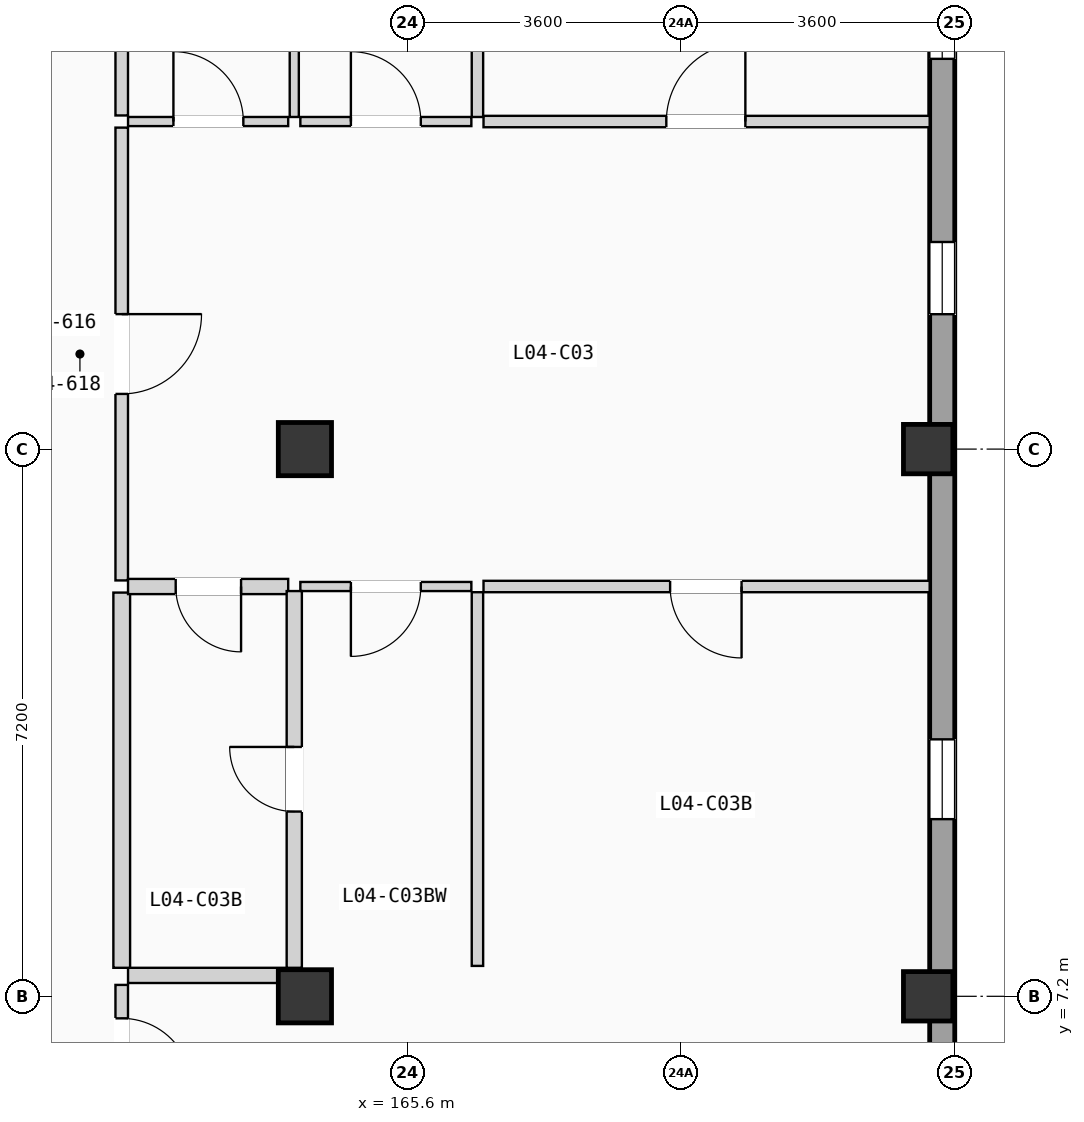
"""IFC4 building model, lengths in metres.
Left out: names, types, materials, properties, quantities, classifications, styles, units other than length and angle.
Written with IfcOpenShell. Run it as: python <this file> out.ifc"""

import sys

from ifc_helpers import new_model, si_unit, direction, frame, frame_2d, origin, origin_2d, place, context, subcontext, project, spatial, rectangle, extrude, element, fill, save


model = new_model("IFC4")
c1 = context("Model", 3, precision=1e-05, world=origin(), true_north=direction((0.0, 1.0)))
c2 = subcontext(c1, "Body", "Model", "MODEL_VIEW")
j1 = project(units=[si_unit("LENGTHUNIT", "METRE"), si_unit("PLANEANGLEUNIT", "RADIAN")], contexts=[c1])
p1 = place(None, origin())
s1 = spatial("IfcSite", under=j1, at=p1, CompositionType="ELEMENT")
p2 = place(p1, origin())
s2 = spatial("IfcBuilding", under=s1, at=p2, CompositionType="ELEMENT")
p3 = place(p2, frame((0.0, 0.0, 15.225)))
s3 = spatial("IfcBuildingStorey", under=s2, at=p3, CompositionType="ELEMENT", Elevation=15.225)
for number, where, z_axis, x_axis in (
    (1, (164.25, 7.2, 0.0), (0.0, 0.0, 1.0), (1.0, 0.0, 0.0)),
    (2, (164.25, 14.4, 0.0), (0.0, 0.0, 1.0), (1.0, 0.0, 0.0)),
):
    element("IfcColumn", number, at=place(p3, frame(where, z_axis=z_axis, x_axis=x_axis)), inside=s3, PredefinedType="COLUMN", context=c2, shape_type="SweptSolid", body=[
        extrude(rectangle(XDim=0.7, YDim=0.7, at=origin_2d()), origin(), (0.0, 0.0, 1.0), 3.15),
    ])
for number, where, z_axis, x_axis in (
    (3, (172.45, 7.2, 0.0), (0.0, 0.0, 1.0), (1.0, 0.0, 0.0)),
    (4, (172.45, 14.4, 0.0), (0.0, 0.0, 1.0), (1.0, 0.0, 0.0)),
):
    element("IfcColumn", number, at=place(p3, frame(where, z_axis=z_axis, x_axis=x_axis)), inside=s3, PredefinedType="COLUMN", context=c2, shape_type="SweptSolid", body=[
        extrude(rectangle(XDim=0.65, YDim=0.65, at=origin_2d()), origin(), (0.0, 0.0, 1.0), 3.15),
    ])
p4 = place(p3, frame((172.635, 0.33, 0.0), z_axis=(0.0, 0.0, 1.0), x_axis=(0.0, 1.0, 0.0)))
e5 = element("IfcWall", 5, at=p4, inside=s3, PredefinedType="SOLIDWALL", context=c2, shape_type="SweptSolid", body=[
    extrude(rectangle(XDim=49.74, YDim=0.33, at=frame_2d((24.87, 0.0))), origin(), (0.0, 0.0, 1.0), 2.89),
])
p5 = place(p4, frame((15.845, 0.0, 0.85)))
e6 = element("IfcOpeningElement", 6, at=p5, cuts=e5, PredefinedType="OPENING", context=c2, shape_type="SweptSolid", body=[
    extrude(rectangle(XDim=0.95, YDim=1.2, at=frame_2d((0.475, 0.6))), frame((0.0, 0.175, 0.0), z_axis=(0.0, -1.0, 0.0), x_axis=(1.0, 0.0, 0.0)), (0.0, 0.0, 1.0), 0.35),
])
p6 = place(p4, frame((9.201, 0.0, 0.9)))
e7 = element("IfcOpeningElement", 7, at=p6, cuts=e5, PredefinedType="OPENING", context=c2, shape_type="SweptSolid", body=[
    extrude(rectangle(XDim=1.05, YDim=1.2, at=frame_2d((0.525, 0.6))), frame((0.0, 0.175, 0.0), z_axis=(0.0, -1.0, 0.0), x_axis=(1.0, 0.0, 0.0)), (0.0, 0.0, 1.0), 0.35),
])
p7 = place(p4, frame((19.205, 0.0, 0.855)))
e8 = element("IfcOpeningElement", 8, at=p7, cuts=e5, PredefinedType="OPENING", context=c2, shape_type="SweptSolid", body=[
    extrude(rectangle(XDim=1.05, YDim=1.35, at=frame_2d((0.525, 0.675))), frame((0.0, 0.175, 0.0), z_axis=(0.0, -1.0, 0.0), x_axis=(1.0, 0.0, 0.0)), (0.0, 0.0, 1.0), 0.35),
])
p8 = place(p4, frame((31.923, 0.0, 0.705)))
e9 = element("IfcOpeningElement", 9, at=p8, cuts=e5, PredefinedType="OPENING", context=c2, shape_type="SweptSolid", body=[
    extrude(rectangle(XDim=1.05, YDim=1.5, at=frame_2d((0.525, 0.75))), frame((0.0, 0.175, 0.0), z_axis=(0.0, -1.0, 0.0), x_axis=(1.0, 0.0, 0.0)), (0.0, 0.0, 1.0), 0.35),
])
p9 = place(p4, frame((25.351, 0.0, 0.555)))
e10 = element("IfcOpeningElement", 10, at=p9, cuts=e5, PredefinedType="OPENING", context=c2, shape_type="SweptSolid", body=[
    extrude(rectangle(XDim=1.05, YDim=1.65, at=frame_2d((0.525, 0.825))), frame((0.0, 0.175, 0.0), z_axis=(0.0, -1.0, 0.0), x_axis=(1.0, 0.0, 0.0)), (0.0, 0.0, 1.0), 0.35),
])
p10 = place(p4, frame((39.102, 0.0, 0.85)))
e11 = element("IfcOpeningElement", 11, at=p10, cuts=e5, PredefinedType="OPENING", context=c2, shape_type="SweptSolid", body=[
    extrude(rectangle(XDim=0.95, YDim=1.2, at=frame_2d((0.475, 0.6))), frame((0.0, 0.175, 0.0), z_axis=(0.0, -1.0, 0.0), x_axis=(1.0, 0.0, 0.0)), (0.0, 0.0, 1.0), 0.35),
])
p11 = place(p3, frame((161.84, 5.515, 0.0), z_axis=(0.0, 0.0, 1.0), x_axis=(0.0, 1.0, 0.0)))
e12 = element("IfcWall", 12, at=p11, inside=s3, PredefinedType="PARTITIONING", context=c2, shape_type="SweptSolid", body=[
    extrude(rectangle(XDim=1.835, YDim=0.165, at=frame_2d((0.917, 0.0))), origin(), (0.0, 0.0, 1.0), 2.87),
])
p12 = place(p11, frame((0.475, 0.0, 0.0)))
e13 = element("IfcOpeningElement", 13, at=p12, cuts=e12, PredefinedType="OPENING", context=c2, shape_type="SweptSolid", body=[
    extrude(rectangle(XDim=0.92, YDim=2.04, at=frame_2d((0.46, 1.02))), frame((0.0, 0.093, 0.0), z_axis=(0.0, -1.0, 0.0), x_axis=(1.0, 0.0, 0.0)), (0.0, 0.0, 1.0), 0.185),
])
p13 = place(p3, frame((161.923, 7.475, 0.0), z_axis=(0.0, 0.0, 1.0), x_axis=(1.0, 0.0, 0.0)))
e14 = element("IfcWall", 14, at=p13, inside=s3, PredefinedType="PLUMBINGWALL", context=c2, shape_type="SweptSolid", body=[
    extrude(rectangle(XDim=2.107, YDim=0.2, at=frame_2d((1.053, 0.0))), origin(), (0.0, 0.0, 1.0), 2.87),
])
p14 = place(p3, frame((161.84, 12.672, 0.0), z_axis=(0.0, 0.0, 1.0), x_axis=(0.0, 1.0, 0.0)))
e15 = element("IfcWall", 15, at=p14, inside=s3, PredefinedType="PARTITIONING", context=c2, shape_type="SweptSolid", body=[
    extrude(rectangle(XDim=5.958, YDim=0.165, at=frame_2d((2.979, 0.0))), origin(), (0.0, 0.0, 1.0), 2.87),
])
p15 = place(p14, frame((2.454, 0.0, 0.0)))
e16 = element("IfcOpeningElement", 16, at=p15, cuts=e15, PredefinedType="OPENING", context=c2, shape_type="SweptSolid", body=[
    extrude(rectangle(XDim=1.05, YDim=2.13, at=frame_2d((0.525, 1.065))), frame((0.0, 0.093, 0.0), z_axis=(0.0, -1.0, 0.0), x_axis=(1.0, 0.0, 0.0)), (0.0, 0.0, 1.0), 0.185),
])
p16 = place(p3, frame((161.84, 7.575, 0.0), z_axis=(0.0, 0.0, 1.0), x_axis=(0.0, 1.0, 0.0)))
e17 = element("IfcWall", 17, at=p16, inside=s3, PredefinedType="PLUMBINGWALL", context=c2, shape_type="SweptSolid", body=[
    extrude(rectangle(XDim=4.937, YDim=0.22, at=frame_2d((2.469, 0.0))), origin(), (0.0, 0.0, 1.0), 2.87),
])
p17 = place(p3, frame((161.84, 18.79, 0.0), z_axis=(0.0, 0.0, 1.0), x_axis=(0.0, 1.0, 0.0)))
e18 = element("IfcWall", 18, at=p17, inside=s3, PredefinedType="PARTITIONING", context=c2, shape_type="SweptSolid", body=[
    extrude(rectangle(XDim=4.912, YDim=0.165, at=frame_2d((2.456, 0.0))), origin(), (0.0, 0.0, 1.0), 2.87),
])
p18 = place(p3, frame((161.923, 12.592, 0.0), z_axis=(0.0, 0.0, 1.0), x_axis=(1.0, 0.0, 0.0)))
e19 = element("IfcWall", 19, at=p18, inside=s3, PredefinedType="PLUMBINGWALL", context=c2, shape_type="SweptSolid", body=[
    extrude(rectangle(XDim=2.107, YDim=0.2, at=frame_2d((1.053, 0.0))), origin(), (0.0, 0.0, 1.0), 2.87),
])
p19 = place(p18, frame((0.627, 0.0, 0.0)))
e20 = element("IfcOpeningElement", 20, at=p19, cuts=e19, PredefinedType="OPENING", context=c2, shape_type="SweptSolid", body=[
    extrude(rectangle(XDim=0.86, YDim=2.0, at=frame_2d((0.43, 1.0))), frame((0.0, 0.11, 0.0), z_axis=(0.0, -1.0, 0.0), x_axis=(1.0, 0.0, 0.0)), (0.0, 0.0, 1.0), 0.22),
])
p20 = place(p3, frame((161.923, 18.71, 0.0), z_axis=(0.0, 0.0, 1.0), x_axis=(1.0, 0.0, 0.0)))
e21 = element("IfcWall", 21, at=p20, inside=s3, PredefinedType="PARTITIONING", context=c2, shape_type="SweptSolid", body=[
    extrude(rectangle(XDim=2.107, YDim=0.12, at=frame_2d((1.053, 0.0))), origin(), (0.0, 0.0, 1.0), 2.87),
])
p21 = place(p20, frame((0.597, 0.0, 0.0)))
e22 = element("IfcOpeningElement", 22, at=p21, cuts=e21, PredefinedType="OPENING", context=c2, shape_type="SweptSolid", body=[
    extrude(rectangle(XDim=0.92, YDim=2.02, at=frame_2d((0.46, 1.01))), frame((0.0, 0.07, 0.0), z_axis=(0.0, -1.0, 0.0), x_axis=(1.0, 0.0, 0.0)), (0.0, 0.0, 1.0), 0.14),
])
p22 = place(p3, frame((166.6, 12.592, 0.0), z_axis=(0.0, 0.0, 1.0), x_axis=(1.0, 0.0, 0.0)))
e23 = element("IfcWall", 23, at=p22, inside=s3, PredefinedType="PARTITIONING", context=c2, shape_type="SweptSolid", body=[
    extrude(rectangle(XDim=5.87, YDim=0.15, at=frame_2d((2.935, 0.0))), origin(), (0.0, 0.0, 1.0), 2.87),
])
p23 = place(p22, frame((2.455, 0.0, 0.0)))
e24 = element("IfcOpeningElement", 24, at=p23, cuts=e23, PredefinedType="OPENING", context=c2, shape_type="SweptSolid", body=[
    extrude(rectangle(XDim=0.94, YDim=2.06, at=frame_2d((0.47, 1.03))), frame((0.0, 0.085, 0.0), z_axis=(0.0, -1.0, 0.0), x_axis=(1.0, 0.0, 0.0)), (0.0, 0.0, 1.0), 0.17),
])
p24 = place(p3, frame((164.19, 12.592, 0.0), z_axis=(0.0, 0.0, 1.0), x_axis=(1.0, 0.0, 0.0)))
e25 = element("IfcWall", 25, at=p24, inside=s3, PredefinedType="PARTITIONING", context=c2, shape_type="SweptSolid", body=[
    extrude(rectangle(XDim=2.25, YDim=0.12, at=frame_2d((1.125, 0.0))), origin(), (0.0, 0.0, 1.0), 2.87),
])
p25 = place(p24, frame((0.665, 0.0, 0.0)))
e26 = element("IfcOpeningElement", 26, at=p25, cuts=e25, PredefinedType="OPENING", context=c2, shape_type="SweptSolid", body=[
    extrude(rectangle(XDim=0.92, YDim=2.02, at=frame_2d((0.46, 1.01))), frame((0.0, 0.07, 0.0), z_axis=(0.0, -1.0, 0.0), x_axis=(1.0, 0.0, 0.0)), (0.0, 0.0, 1.0), 0.14),
])
p26 = place(p3, frame((166.6, 18.71, 0.0), z_axis=(0.0, 0.0, 1.0), x_axis=(1.0, 0.0, 0.0)))
e27 = element("IfcWall", 27, at=p26, inside=s3, PredefinedType="PARTITIONING", context=c2, shape_type="SweptSolid", body=[
    extrude(rectangle(XDim=5.87, YDim=0.15, at=frame_2d((2.935, 0.0))), origin(), (0.0, 0.0, 1.0), 2.87),
])
p27 = place(p26, frame((2.405, 0.0, 0.0)))
e28 = element("IfcOpeningElement", 28, at=p27, cuts=e27, PredefinedType="OPENING", context=c2, shape_type="SweptSolid", body=[
    extrude(rectangle(XDim=1.04, YDim=2.08, at=frame_2d((0.52, 1.04))), frame((0.0, 0.085, 0.0), z_axis=(0.0, -1.0, 0.0), x_axis=(1.0, 0.0, 0.0)), (0.0, 0.0, 1.0), 0.17),
])
p28 = place(p3, frame((164.19, 18.71, 0.0), z_axis=(0.0, 0.0, 1.0), x_axis=(1.0, 0.0, 0.0)))
e29 = element("IfcWall", 29, at=p28, inside=s3, PredefinedType="PARTITIONING", context=c2, shape_type="SweptSolid", body=[
    extrude(rectangle(XDim=2.25, YDim=0.12, at=frame_2d((1.125, 0.0))), origin(), (0.0, 0.0, 1.0), 2.87),
])
p29 = place(p28, frame((0.665, 0.0, 0.0)))
e30 = element("IfcOpeningElement", 30, at=p29, cuts=e29, PredefinedType="OPENING", context=c2, shape_type="SweptSolid", body=[
    extrude(rectangle(XDim=0.92, YDim=2.02, at=frame_2d((0.46, 1.01))), frame((0.0, 0.07, 0.0), z_axis=(0.0, -1.0, 0.0), x_axis=(1.0, 0.0, 0.0)), (0.0, 0.0, 1.0), 0.14),
])
p30 = place(p3, frame((164.11, 7.575, 0.0), z_axis=(0.0, 0.0, 1.0), x_axis=(0.0, 1.0, 0.0)))
e31 = element("IfcWall", 31, at=p30, inside=s3, PredefinedType="PLUMBINGWALL", context=c2, shape_type="SweptSolid", body=[
    extrude(rectangle(XDim=4.957, YDim=0.2, at=frame_2d((2.479, 0.0))), origin(), (0.0, 0.0, 1.0), 2.87),
])
p31 = place(p30, frame((2.056, 0.0, 0.0)))
e32 = element("IfcOpeningElement", 32, at=p31, cuts=e31, PredefinedType="OPENING", context=c2, shape_type="SweptSolid", body=[
    extrude(rectangle(XDim=0.85, YDim=2.01, at=frame_2d((0.425, 1.005))), frame((0.0, 0.11, 0.0), z_axis=(0.0, -1.0, 0.0), x_axis=(1.0, 0.0, 0.0)), (0.0, 0.0, 1.0), 0.22),
])
p32 = place(p3, frame((164.11, 18.77, 0.0), z_axis=(0.0, 0.0, 1.0), x_axis=(0.0, 1.0, 0.0)))
e33 = element("IfcWall", 33, at=p32, inside=s3, PredefinedType="PARTITIONING", context=c2, shape_type="SweptSolid", body=[
    extrude(rectangle(XDim=4.932, YDim=0.12, at=frame_2d((2.466, 0.0))), origin(), (0.0, 0.0, 1.0), 2.87),
])
p33 = place(p3, frame((166.52, 7.6, 0.0), z_axis=(0.0, 0.0, 1.0), x_axis=(0.0, 1.0, 0.0)))
e34 = element("IfcWall", 34, at=p33, inside=s3, PredefinedType="PARTITIONING", context=c2, shape_type="SweptSolid", body=[
    extrude(rectangle(XDim=4.917, YDim=0.15, at=frame_2d((2.458, 0.0))), origin(), (0.0, 0.0, 1.0), 2.87),
])
p34 = place(p3, frame((166.52, 18.77, 0.0), z_axis=(0.0, 0.0, 1.0), x_axis=(0.0, 1.0, 0.0)))
e35 = element("IfcWall", 35, at=p34, inside=s3, PredefinedType="PARTITIONING", context=c2, shape_type="SweptSolid", body=[
    extrude(rectangle(XDim=4.932, YDim=0.15, at=frame_2d((2.466, 0.0))), origin(), (0.0, 0.0, 1.0), 2.87),
])
p35 = place(p5, origin())
e36 = element("IfcWindow", 36, at=p35, inside=s3, PartitioningType="SINGLE_PANEL", PredefinedType="WINDOW", context=c2, shape_type="SweptSolid", body=[
    extrude(rectangle(XDim=0.95, YDim=1.2, at=frame_2d((0.475, 0.6))), frame((0.0, 0.03, 0.0), z_axis=(0.0, -1.0, 0.0), x_axis=(1.0, 0.0, 0.0)), (0.0, 0.0, 1.0), 0.06),
])
fill(e6, e36)
p36 = place(p6, origin())
e37 = element("IfcWindow", 37, at=p36, inside=s3, PartitioningType="SINGLE_PANEL", PredefinedType="WINDOW", context=c2, shape_type="SweptSolid", body=[
    extrude(rectangle(XDim=1.05, YDim=1.2, at=frame_2d((0.525, 0.6))), frame((0.0, 0.03, 0.0), z_axis=(0.0, -1.0, 0.0), x_axis=(1.0, 0.0, 0.0)), (0.0, 0.0, 1.0), 0.06),
])
fill(e7, e37)
p37 = place(p7, origin())
e38 = element("IfcWindow", 38, at=p37, inside=s3, PartitioningType="SINGLE_PANEL", PredefinedType="WINDOW", context=c2, shape_type="SweptSolid", body=[
    extrude(rectangle(XDim=1.05, YDim=1.35, at=frame_2d((0.525, 0.675))), frame((0.0, 0.03, 0.0), z_axis=(0.0, -1.0, 0.0), x_axis=(1.0, 0.0, 0.0)), (0.0, 0.0, 1.0), 0.06),
])
fill(e8, e38)
p38 = place(p12, frame((0.92, 0.0, 0.0), z_axis=(0.0, 0.0, 1.0), x_axis=(-1.0, 0.0, 0.0)))
e39 = element("IfcDoor", 39, at=p38, inside=s3, OperationType="SINGLE_SWING_LEFT", PredefinedType="DOOR", context=c2, shape_type="SweptSolid", body=[
    extrude(rectangle(XDim=0.92, YDim=2.04, at=frame_2d((0.46, 1.02))), frame((0.0, 0.025, 0.0), z_axis=(0.0, -1.0, 0.0), x_axis=(1.0, 0.0, 0.0)), (0.0, 0.0, 1.0), 0.05),
])
fill(e13, e39)
p39 = place(p15, frame((1.05, 0.0, 0.0), z_axis=(0.0, 0.0, 1.0), x_axis=(-1.0, 0.0, 0.0)))
e40 = element("IfcDoor", 40, at=p39, inside=s3, OperationType="SINGLE_SWING_RIGHT", PredefinedType="DOOR", context=c2, shape_type="SweptSolid", body=[
    extrude(rectangle(XDim=1.05, YDim=2.13, at=frame_2d((0.525, 1.065))), frame((0.0, 0.025, 0.0), z_axis=(0.0, -1.0, 0.0), x_axis=(1.0, 0.0, 0.0)), (0.0, 0.0, 1.0), 0.05),
])
fill(e16, e40)
p40 = place(p19, frame((0.86, 0.0, 0.0), z_axis=(0.0, 0.0, 1.0), x_axis=(-1.0, 0.0, 0.0)))
e41 = element("IfcDoor", 41, at=p40, inside=s3, OperationType="SINGLE_SWING_RIGHT", PredefinedType="DOOR", context=c2, shape_type="SweptSolid", body=[
    extrude(rectangle(XDim=0.86, YDim=2.0, at=frame_2d((0.43, 1.0))), frame((0.0, 0.025, 0.0), z_axis=(0.0, -1.0, 0.0), x_axis=(1.0, 0.0, 0.0)), (0.0, 0.0, 1.0), 0.05),
])
fill(e20, e41)
p41 = place(p21, origin())
e42 = element("IfcDoor", 42, at=p41, inside=s3, OperationType="SINGLE_SWING_LEFT", PredefinedType="DOOR", context=c2, shape_type="SweptSolid", body=[
    extrude(rectangle(XDim=0.92, YDim=2.02, at=frame_2d((0.46, 1.01))), frame((0.0, 0.025, 0.0), z_axis=(0.0, -1.0, 0.0), x_axis=(1.0, 0.0, 0.0)), (0.0, 0.0, 1.0), 0.05),
])
fill(e22, e42)
p42 = place(p23, frame((0.94, 0.0, 0.0), z_axis=(0.0, 0.0, 1.0), x_axis=(-1.0, 0.0, 0.0)))
e43 = element("IfcDoor", 43, at=p42, inside=s3, OperationType="SINGLE_SWING_RIGHT", PredefinedType="DOOR", context=c2, shape_type="SweptSolid", body=[
    extrude(rectangle(XDim=0.94, YDim=2.06, at=frame_2d((0.47, 1.03))), frame((0.0, 0.025, 0.0), z_axis=(0.0, -1.0, 0.0), x_axis=(1.0, 0.0, 0.0)), (0.0, 0.0, 1.0), 0.05),
])
fill(e24, e43)
p43 = place(p25, frame((0.92, 0.0, 0.0), z_axis=(0.0, 0.0, 1.0), x_axis=(-1.0, 0.0, 0.0)))
e44 = element("IfcDoor", 44, at=p43, inside=s3, OperationType="SINGLE_SWING_LEFT", PredefinedType="DOOR", context=c2, shape_type="SweptSolid", body=[
    extrude(rectangle(XDim=0.92, YDim=2.02, at=frame_2d((0.46, 1.01))), frame((0.0, 0.025, 0.0), z_axis=(0.0, -1.0, 0.0), x_axis=(1.0, 0.0, 0.0)), (0.0, 0.0, 1.0), 0.05),
])
fill(e26, e44)
p44 = place(p27, origin())
e45 = element("IfcDoor", 45, at=p44, inside=s3, OperationType="SINGLE_SWING_RIGHT", PredefinedType="DOOR", context=c2, shape_type="SweptSolid", body=[
    extrude(rectangle(XDim=1.04, YDim=2.08, at=frame_2d((0.52, 1.04))), frame((0.0, 0.025, 0.0), z_axis=(0.0, -1.0, 0.0), x_axis=(1.0, 0.0, 0.0)), (0.0, 0.0, 1.0), 0.05),
])
fill(e28, e45)
p45 = place(p29, origin())
e46 = element("IfcDoor", 46, at=p45, inside=s3, OperationType="SINGLE_SWING_LEFT", PredefinedType="DOOR", context=c2, shape_type="SweptSolid", body=[
    extrude(rectangle(XDim=0.92, YDim=2.02, at=frame_2d((0.46, 1.01))), frame((0.0, 0.025, 0.0), z_axis=(0.0, -1.0, 0.0), x_axis=(1.0, 0.0, 0.0)), (0.0, 0.0, 1.0), 0.05),
])
fill(e30, e46)
p46 = place(p31, origin())
e47 = element("IfcDoor", 47, at=p46, inside=s3, OperationType="SINGLE_SWING_RIGHT", PredefinedType="DOOR", context=c2, shape_type="SweptSolid", body=[
    extrude(rectangle(XDim=0.85, YDim=2.01, at=frame_2d((0.425, 1.005))), frame((0.0, 0.025, 0.0), z_axis=(0.0, -1.0, 0.0), x_axis=(1.0, 0.0, 0.0)), (0.0, 0.0, 1.0), 0.05),
])
fill(e32, e47)
save(model, sys.argv[1])
